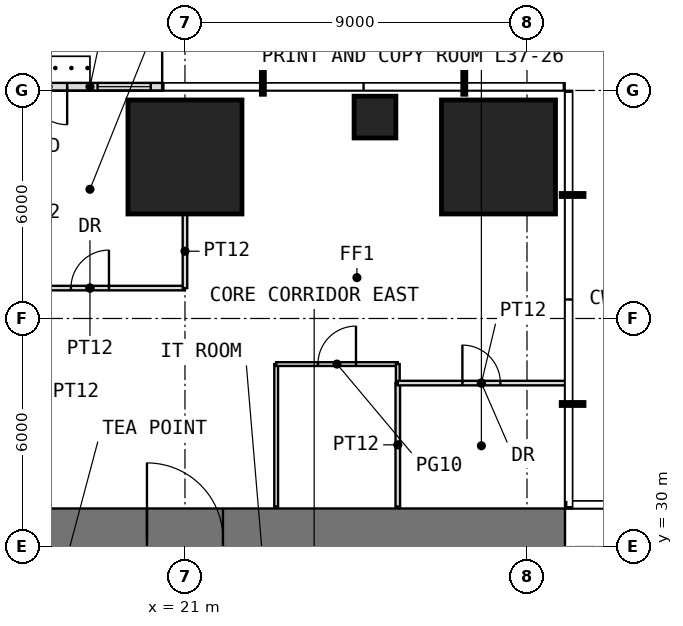
"""IFC4 building model, lengths in metres.
Left out: names, types, materials, properties, quantities, classifications, styles, units other than length and angle.
Written with IfcOpenShell. Run it as: python <this file> out.ifc"""

import sys

from ifc_helpers import new_model, si_unit, direction, frame, frame_2d, origin, origin_2d, place, context, subcontext, project, spatial, rectangle, extrude, element, fill, save


model = new_model("IFC4")
c1 = context("Model", 3, precision=1e-05, world=origin(), true_north=direction((0.0, 1.0)))
c2 = subcontext(c1, "Body", "Model", "MODEL_VIEW")
j1 = project(units=[si_unit("LENGTHUNIT", "METRE"), si_unit("PLANEANGLEUNIT", "RADIAN")], contexts=[c1])
p1 = place(None, origin())
s1 = spatial("IfcSite", under=j1, at=p1, CompositionType="ELEMENT")
p2 = place(p1, origin())
s2 = spatial("IfcBuilding", under=s1, at=p2, CompositionType="ELEMENT")
p3 = place(p2, frame((0.0, 0.0, 156.5)))
s3 = spatial("IfcBuildingStorey", under=s2, at=p3, CompositionType="ELEMENT", Elevation=156.5)
p4 = place(p3, frame((21.0, 40.25, 0.0), z_axis=(0.0, 0.0, 1.0), x_axis=(1.0, 0.0, 0.0)))
e1 = element("IfcColumn", 1, at=p4, inside=s3, PredefinedType="COLUMN", context=c2, shape_type="SweptSolid", body=[
    extrude(rectangle(XDim=3.0, YDim=3.0, at=origin_2d()), origin(), (0.0, 0.0, 1.0), 4.0),
])
p5 = place(p3, frame((26.0, 41.3, 0.0), z_axis=(0.0, 0.0, 1.0), x_axis=(1.0, 0.0, 0.0)))
e2 = element("IfcColumn", 2, at=p5, inside=s3, PredefinedType="COLUMN", context=c2, shape_type="SweptSolid", body=[
    extrude(rectangle(XDim=1.1, YDim=1.1, at=origin_2d()), origin(), (0.0, 0.0, 1.0), 4.0),
])
p6 = place(p3, frame((29.25, 40.25, 0.0), z_axis=(0.0, 0.0, 1.0), x_axis=(1.0, 0.0, 0.0)))
e3 = element("IfcColumn", 3, at=p6, inside=s3, PredefinedType="COLUMN", context=c2, shape_type="SweptSolid", body=[
    extrude(rectangle(XDim=3.0, YDim=3.0, at=origin_2d()), origin(), (0.0, 0.0, 1.0), 4.0),
])
p7 = place(p3, frame((20.4, 42.1, 0.0), z_axis=(0.0, 0.0, 1.0), x_axis=(-1.0, 0.0, 0.0)))
e4 = element("IfcWall", 4, at=p7, inside=s3, PredefinedType="USERDEFINED", context=c2, shape_type="SweptSolid", body=[
    extrude(rectangle(XDim=3.8, YDim=0.2, at=frame_2d((1.9, 0.0))), origin(), (0.0, 0.0, 1.0), 3.55),
])
p8 = place(p7, frame((2.5, 0.0, 0.0)))
e5 = element("IfcOpeningElement", 5, at=p8, cuts=e4, PredefinedType="OPENING", context=c2, shape_type="SweptSolid", body=[
    extrude(rectangle(XDim=1.0, YDim=2.4, at=frame_2d((0.5, 1.2))), frame((0.0, 0.11, 0.0), z_axis=(0.0, -1.0, 0.0), x_axis=(1.0, 0.0, 0.0)), (0.0, 0.0, 1.0), 0.22),
])
p9 = place(p7, frame((0.3, 0.0, 0.3)))
e6 = element("IfcOpeningElement", 6, at=p9, cuts=e4, PredefinedType="OPENING", context=c2, shape_type="SweptSolid", body=[
    extrude(rectangle(XDim=1.4, YDim=2.7, at=frame_2d((0.7, 1.35))), frame((0.0, 0.11, 0.0), z_axis=(0.0, -1.0, 0.0), x_axis=(1.0, 0.0, 0.0)), (0.0, 0.0, 1.0), 0.22),
])
p10 = place(p3, frame((11.0, 30.2, -0.05), z_axis=(0.0, 0.0, 1.0), x_axis=(1.0, 0.0, 0.0)))
e7 = element("IfcWall", 7, at=p10, inside=s3, PredefinedType="SHEAR", context=c2, shape_type="SweptSolid", body=[
    extrude(rectangle(XDim=20.0, YDim=1.6, at=frame_2d((10.0, 0.0))), origin(), (0.0, 0.0, 1.0), 3.8),
])
p11 = place(p10, frame((9.0, 0.0, 0.05)))
e8 = element("IfcOpeningElement", 8, at=p11, cuts=e7, PredefinedType="OPENING", context=c2, shape_type="SweptSolid", body=[
    extrude(rectangle(XDim=2.0, YDim=2.2, at=frame_2d((1.0, 1.1))), frame((0.0, 0.81, 0.0), z_axis=(0.0, -1.0, 0.0), x_axis=(1.0, 0.0, 0.0)), (0.0, 0.0, 1.0), 1.62),
])
p12 = place(p3, frame((16.0, 36.8, 0.0), z_axis=(0.0, 0.0, 1.0), x_axis=(1.0, 0.0, 0.0)))
e9 = element("IfcWall", 9, at=p12, inside=s3, PredefinedType="PARTITIONING", context=c2, shape_type="SweptSolid", body=[
    extrude(rectangle(XDim=5.0, YDim=0.12, at=frame_2d((2.5, 0.0))), origin(), (0.0, 0.0, 1.0), 3.55),
])
p13 = place(p12, frame((2.0, 0.0, 0.0)))
e10 = element("IfcOpeningElement", 10, at=p13, cuts=e9, PredefinedType="OPENING", context=c2, shape_type="SweptSolid", body=[
    extrude(rectangle(XDim=1.0, YDim=2.2, at=frame_2d((0.5, 1.1))), frame((0.0, 0.07, 0.0), z_axis=(0.0, -1.0, 0.0), x_axis=(1.0, 0.0, 0.0)), (0.0, 0.0, 1.0), 0.14),
])
p14 = place(p3, frame((21.0, 36.8, 0.0), z_axis=(0.0, 0.0, 1.0), x_axis=(0.0, 1.0, 0.0)))
e11 = element("IfcWall", 11, at=p14, inside=s3, PredefinedType="PARTITIONING", context=c2, shape_type="SweptSolid", body=[
    extrude(rectangle(XDim=1.94, YDim=0.12, at=frame_2d((0.97, 0.0))), origin(), (0.0, 0.0, 1.0), 3.55),
])
p15 = place(p3, frame((23.4, 31.05, 0.0), z_axis=(0.0, 0.0, 1.0), x_axis=(0.0, 1.0, 0.0)))
e12 = element("IfcWall", 12, at=p15, inside=s3, PredefinedType="PARTITIONING", context=c2, shape_type="SweptSolid", body=[
    extrude(rectangle(XDim=3.75, YDim=0.1, at=frame_2d((1.875, 0.0))), origin(), (0.0, 0.0, 1.0), 3.55),
])
p16 = place(p3, frame((23.4, 34.8, 0.0), z_axis=(0.0, 0.0, 1.0), x_axis=(1.0, 0.0, 0.0)))
e13 = element("IfcWall", 13, at=p16, inside=s3, PredefinedType="PARTITIONING", context=c2, shape_type="SweptSolid", body=[
    extrude(rectangle(XDim=3.2, YDim=0.1, at=frame_2d((1.6, 0.0))), origin(), (0.0, 0.0, 1.0), 3.55),
])
p17 = place(p16, frame((1.1, 0.0, 0.0)))
e14 = element("IfcOpeningElement", 14, at=p17, cuts=e13, PredefinedType="OPENING", context=c2, shape_type="SweptSolid", body=[
    extrude(rectangle(XDim=1.0, YDim=2.4, at=frame_2d((0.5, 1.2))), frame((0.0, 0.06, 0.0), z_axis=(0.0, -1.0, 0.0), x_axis=(1.0, 0.0, 0.0)), (0.0, 0.0, 1.0), 0.12),
])
p18 = place(p3, frame((26.6, 31.05, 0.0), z_axis=(0.0, 0.0, 1.0), x_axis=(0.0, 1.0, 0.0)))
e15 = element("IfcWall", 15, at=p18, inside=s3, PredefinedType="PARTITIONING", context=c2, shape_type="SweptSolid", body=[
    extrude(rectangle(XDim=3.25, YDim=0.12, at=frame_2d((1.625, 0.0))), origin(), (0.0, 0.0, 1.0), 3.55),
])
p19 = place(p3, frame((26.6, 34.3, 0.0), z_axis=(0.0, 0.0, 1.0), x_axis=(0.0, 1.0, 0.0)))
e16 = element("IfcWall", 16, at=p19, inside=s3, PredefinedType="PARTITIONING", context=c2, shape_type="SweptSolid", body=[
    extrude(rectangle(XDim=0.5, YDim=0.1, at=frame_2d((0.25, 0.0))), origin(), (0.0, 0.0, 1.0), 3.55),
])
p20 = place(p3, frame((26.6, 34.3, 0.0), z_axis=(0.0, 0.0, 1.0), x_axis=(1.0, 0.0, 0.0)))
e17 = element("IfcWall", 17, at=p20, inside=s3, PredefinedType="PARTITIONING", context=c2, shape_type="SweptSolid", body=[
    extrude(rectangle(XDim=4.4, YDim=0.12, at=frame_2d((2.2, 0.0))), origin(), (0.0, 0.0, 1.0), 3.55),
])
p21 = place(p20, frame((1.7, 0.0, 0.0)))
e18 = element("IfcOpeningElement", 18, at=p21, cuts=e17, PredefinedType="OPENING", context=c2, shape_type="SweptSolid", body=[
    extrude(rectangle(XDim=1.0, YDim=2.2, at=frame_2d((0.5, 1.1))), frame((0.0, 0.07, 0.0), z_axis=(0.0, -1.0, 0.0), x_axis=(1.0, 0.0, 0.0)), (0.0, 0.0, 1.0), 0.14),
])
p22 = place(p8, origin())
e19 = element("IfcDoor", 19, at=p22, inside=s3, OperationType="SINGLE_SWING_LEFT", PredefinedType="DOOR", context=c2, shape_type="SweptSolid", body=[
    extrude(rectangle(XDim=1.0, YDim=2.4, at=frame_2d((0.5, 1.2))), frame((0.0, 0.025, 0.0), z_axis=(0.0, -1.0, 0.0), x_axis=(1.0, 0.0, 0.0)), (0.0, 0.0, 1.0), 0.05),
])
fill(e5, e19)
p23 = place(p9, origin())
e20 = element("IfcWindow", 20, at=p23, inside=s3, PartitioningType="SINGLE_PANEL", PredefinedType="WINDOW", context=c2, shape_type="SweptSolid", body=[
    extrude(rectangle(XDim=1.4, YDim=2.7, at=frame_2d((0.7, 1.35))), frame((0.0, 0.03, 0.0), z_axis=(0.0, -1.0, 0.0), x_axis=(1.0, 0.0, 0.0)), (0.0, 0.0, 1.0), 0.06),
])
fill(e6, e20)
p24 = place(p11, origin())
e21 = element("IfcDoor", 21, at=p24, inside=s3, OperationType="DOUBLE_DOOR_SINGLE_SWING", PredefinedType="DOOR", context=c2, shape_type="SweptSolid", body=[
    extrude(rectangle(XDim=2.0, YDim=2.2, at=frame_2d((1.0, 1.1))), frame((0.0, 0.025, 0.0), z_axis=(0.0, -1.0, 0.0), x_axis=(1.0, 0.0, 0.0)), (0.0, 0.0, 1.0), 0.05),
])
fill(e8, e21)
p25 = place(p17, origin())
e22 = element("IfcDoor", 22, at=p25, inside=s3, OperationType="SINGLE_SWING_RIGHT", PredefinedType="DOOR", context=c2, shape_type="SweptSolid", body=[
    extrude(rectangle(XDim=1.0, YDim=2.4, at=frame_2d((0.5, 1.2))), frame((0.0, 0.025, 0.0), z_axis=(0.0, -1.0, 0.0), x_axis=(1.0, 0.0, 0.0)), (0.0, 0.0, 1.0), 0.05),
])
fill(e14, e22)
p26 = place(p21, origin())
e23 = element("IfcDoor", 23, at=p26, inside=s3, OperationType="SINGLE_SWING_LEFT", PredefinedType="DOOR", context=c2, shape_type="SweptSolid", body=[
    extrude(rectangle(XDim=1.0, YDim=2.2, at=frame_2d((0.5, 1.1))), frame((0.0, 0.025, 0.0), z_axis=(0.0, -1.0, 0.0), x_axis=(1.0, 0.0, 0.0)), (0.0, 0.0, 1.0), 0.05),
])
fill(e18, e23)
p27 = place(p13, origin())
e24 = element("IfcDoor", 24, at=p27, inside=s3, OperationType="SINGLE_SWING_RIGHT", PredefinedType="DOOR", context=c2, shape_type="SweptSolid", body=[
    extrude(rectangle(XDim=1.0, YDim=2.2, at=frame_2d((0.5, 1.1))), frame((0.0, 0.025, 0.0), z_axis=(0.0, -1.0, 0.0), x_axis=(1.0, 0.0, 0.0)), (0.0, 0.0, 1.0), 0.05),
])
fill(e10, e24)
save(model, sys.argv[1])
